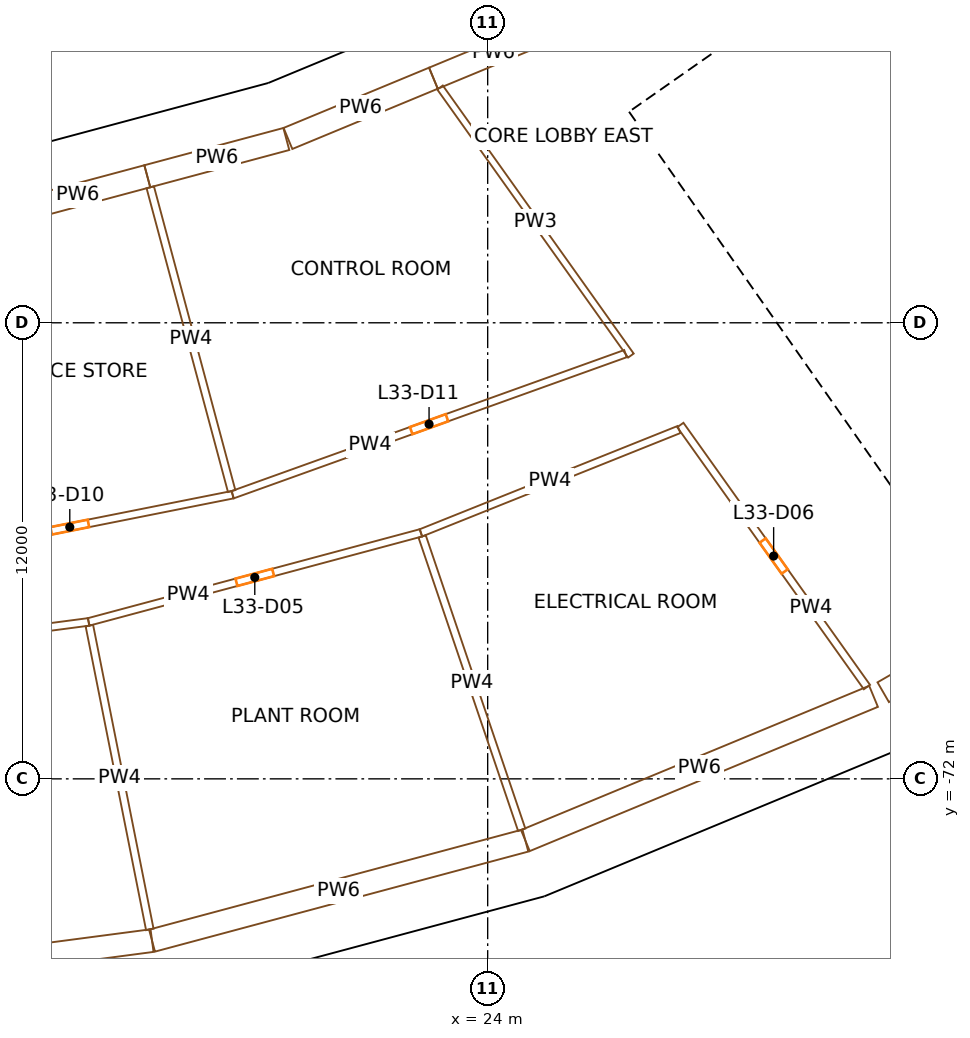
"""IFC4 building model, lengths in metres.
Left out: names, types, materials, properties, quantities, classifications, styles, units other than length and angle.
Written with IfcOpenShell. Run it as: python <this file> out.ifc"""

import sys

from ifc_helpers import new_model, si_unit, direction, frame, frame_2d, origin, origin_2d, place, context, subcontext, project, spatial, rectangle, extrude, element, fill, save


model = new_model("IFC4")
c1 = context("Model", 3, precision=1e-05, world=origin(), true_north=direction((0.0, 1.0)))
c2 = subcontext(c1, "Body", "Model", "MODEL_VIEW")
j1 = project(units=[si_unit("LENGTHUNIT", "METRE"), si_unit("PLANEANGLEUNIT", "RADIAN")], contexts=[c1])
p1 = place(None, origin())
s1 = spatial("IfcSite", under=j1, at=p1, CompositionType="ELEMENT")
p2 = place(p1, origin())
s2 = spatial("IfcBuilding", under=s1, at=p2, CompositionType="ELEMENT")
p3 = place(p2, frame((0.0, 0.0, 144.3)))
s3 = spatial("IfcBuildingStorey", under=s2, at=p3, CompositionType="ELEMENT", Elevation=144.3)
for number, where, z_axis, x_axis in (
    (1, (15.168, -76.256, 0.0), (0.0, 0.0, 1.0), (0.981, 0.195, 0.0)),
    (2, (18.724, -55.159, 0.0), (0.0, 0.0, 1.0), (0.947, 0.321, 0.0)),
    (3, (24.992, -73.624, 0.0), (0.0, 0.0, 1.0), (0.947, 0.321, 0.0)),
    (4, (25.763, -52.243, 0.0), (0.0, 0.0, 1.0), (0.897, 0.442, 0.0)),
    (5, (34.388, -69.732, 0.0), (0.0, 0.0, 1.0), (0.897, 0.442, 0.0)),
):
    element("IfcColumn", number, at=place(p3, frame(where, z_axis=z_axis, x_axis=x_axis)), inside=s3, PredefinedType="COLUMN", context=c2, shape_type="SweptSolid", body=[
        extrude(rectangle(XDim=1.2, YDim=1.5, at=origin_2d()), origin(), (0.0, 0.0, 1.0), 5.0),
    ])
p4 = place(p3, frame((36.717, -66.337, 0.0), z_axis=(0.0, 0.0, 1.0), x_axis=(-0.573577477574, 0.819151315216, 0.0)))
e6 = element("IfcWall", 6, at=p4, inside=s3, PredefinedType="SHEAR", context=c2, shape_type="SweptSolid", body=[
    extrude(rectangle(XDim=14.8, YDim=0.9, at=frame_2d((7.4, 0.0))), origin(), (0.0, 0.0, 1.0), 4.7),
])
p5 = place(p4, frame((6.2, 0.0, 0.0)))
e7 = element("IfcOpeningElement", 7, at=p5, cuts=e6, PredefinedType="OPENING", context=c2, shape_type="SweptSolid", body=[
    extrude(rectangle(XDim=2.4, YDim=2.1, at=frame_2d((1.2, 1.05))), frame((0.0, 0.46, 0.0), z_axis=(0.0, -1.0, 0.0), x_axis=(1.0, 0.0, 0.0)), (0.0, 0.0, 1.0), 0.92),
])
p6 = place(p3, frame((28.854, -54.324, 0.0), z_axis=(0.0, 0.0, 1.0), x_axis=(0.819145767589, 0.573585400304, 0.0)))
e8 = element("IfcWall", 8, at=p6, inside=s3, PredefinedType="SHEAR", context=c2, shape_type="SweptSolid", body=[
    extrude(rectangle(XDim=15.045, YDim=0.9, at=frame_2d((7.523, 0.0))), origin(), (0.0, 0.0, 1.0), 4.7),
])
p7 = place(p6, frame((3.45, 0.0, 0.0)))
e9 = element("IfcOpeningElement", 9, at=p7, cuts=e8, PredefinedType="OPENING", context=c2, shape_type="SweptSolid", body=[
    extrude(rectangle(XDim=1.0, YDim=2.1, at=frame_2d((0.5, 1.05))), frame((0.0, 0.46, 0.0), z_axis=(0.0, -1.0, 0.0), x_axis=(1.0, 0.0, 0.0)), (0.0, 0.0, 1.0), 0.92),
])
p8 = place(p6, frame((13.495, 0.0, 0.0)))
e10 = element("IfcOpeningElement", 10, at=p8, cuts=e8, PredefinedType="OPENING", context=c2, shape_type="SweptSolid", body=[
    extrude(rectangle(XDim=1.1, YDim=2.1, at=frame_2d((0.55, 1.05))), frame((0.0, 0.46, 0.0), z_axis=(0.0, -1.0, 0.0), x_axis=(1.0, 0.0, 0.0)), (0.0, 0.0, 1.0), 0.92),
])
p9 = place(p3, frame((31.895, -58.666, 0.0), z_axis=(0.0, 0.0, 1.0), x_axis=(0.819166993208, 0.573555086491, 0.0)))
e11 = element("IfcWall", 11, at=p9, inside=s3, PredefinedType="SOLIDWALL", context=c2, shape_type="SweptSolid", body=[
    extrude(rectangle(XDim=7.95, YDim=0.3, at=frame_2d((3.975, 0.0))), origin(), (0.0, 0.0, 1.0), 4.7),
])
p10 = place(p9, frame((0.675, 0.0, 0.0)))
e12 = element("IfcOpeningElement", 12, at=p10, cuts=e11, PredefinedType="OPENING", context=c2, shape_type="SweptSolid", body=[
    extrude(rectangle(XDim=1.1, YDim=2.1, at=frame_2d((0.55, 1.05))), frame((0.0, 0.16, 0.0), z_axis=(0.0, -1.0, 0.0), x_axis=(1.0, 0.0, 0.0)), (0.0, 0.0, 1.0), 0.32),
])
p11 = place(p9, frame((3.425, 0.0, 0.0)))
e13 = element("IfcOpeningElement", 13, at=p11, cuts=e11, PredefinedType="OPENING", context=c2, shape_type="SweptSolid", body=[
    extrude(rectangle(XDim=1.1, YDim=2.1, at=frame_2d((0.55, 1.05))), frame((0.0, 0.16, 0.0), z_axis=(0.0, -1.0, 0.0), x_axis=(1.0, 0.0, 0.0)), (0.0, 0.0, 1.0), 0.32),
])
p12 = place(p9, frame((6.175, 0.0, 0.0)))
e14 = element("IfcOpeningElement", 14, at=p12, cuts=e11, PredefinedType="OPENING", context=c2, shape_type="SweptSolid", body=[
    extrude(rectangle(XDim=1.1, YDim=2.1, at=frame_2d((0.55, 1.05))), frame((0.0, 0.16, 0.0), z_axis=(0.0, -1.0, 0.0), x_axis=(1.0, 0.0, 0.0)), (0.0, 0.0, 1.0), 0.32),
])
p13 = place(p3, frame((30.461, -56.618, 0.0), z_axis=(0.0, 0.0, 1.0), x_axis=(0.819142461705, 0.573590121456, 0.0)))
e15 = element("IfcWall", 15, at=p13, inside=s3, PredefinedType="SOLIDWALL", context=c2, shape_type="SweptSolid", body=[
    extrude(rectangle(XDim=7.95, YDim=0.3, at=frame_2d((3.975, 0.0))), origin(), (0.0, 0.0, 1.0), 4.7),
])
p14 = place(p3, frame((33.938, -57.052, 0.0), z_axis=(0.0, 0.0, 1.0), x_axis=(-0.573581496053, 0.819148501424, 0.0)))
e16 = element("IfcWall", 16, at=p14, inside=s3, PredefinedType="SOLIDWALL", context=c2, shape_type="SweptSolid", body=[
    extrude(rectangle(XDim=2.2, YDim=0.3, at=frame_2d((1.1, 0.0))), origin(), (0.0, 0.0, 1.0), 4.7),
])
p15 = place(p3, frame((33.787, -61.369, 3.4), z_axis=(0.0, 0.0, 1.0), x_axis=(0.819139727204, 0.57359402657, 0.0)))
e17 = element("IfcWall", 17, at=p15, inside=s3, PredefinedType="SOLIDWALL", context=c2, shape_type="SweptSolid", body=[
    extrude(rectangle(XDim=5.35, YDim=0.3, at=frame_2d((2.675, 0.0))), origin(), (0.0, 0.0, 1.0), 1.3),
])
p16 = place(p3, frame((18.314, -53.874, 0.0), z_axis=(0.0, 0.0, 1.0), x_axis=(-0.965928708291, -0.258808289086, 0.0)))
e18 = element("IfcWall", 18, at=p16, inside=s3, PredefinedType="SOLIDWALL", context=c2, shape_type="SweptSolid", body=[
    extrude(rectangle(XDim=7.493, YDim=0.4, at=frame_2d((3.747, 0.0))), origin(), (0.0, 0.0, 1.0), 3.6),
])
p17 = place(p3, frame((25.12, -51.052, 0.0), z_axis=(0.0, 0.0, 1.0), x_axis=(-0.923875784142, -0.382692481603, 0.0)))
e19 = element("IfcWall", 19, at=p17, inside=s3, PredefinedType="SOLIDWALL", context=c2, shape_type="SweptSolid", body=[
    extrude(rectangle(XDim=7.342, YDim=0.4, at=frame_2d((3.671, 0.0))), origin(), (0.0, 0.0, 1.0), 3.6),
])
p18 = place(p3, frame((15.48, -77.567, 0.0), z_axis=(0.0, 0.0, 1.0), x_axis=(0.965921778254, 0.258834152101, 0.0)))
e20 = element("IfcWall", 20, at=p18, inside=s3, PredefinedType="SOLIDWALL", context=c2, shape_type="SweptSolid", body=[
    extrude(rectangle(XDim=10.245, YDim=0.4, at=frame_2d((5.123, 0.0))), origin(), (0.0, 0.0, 1.0), 3.6),
])
p19 = place(p3, frame((25.403, -74.911, 0.0), z_axis=(0.0, 0.0, 1.0), x_axis=(0.923878024815, 0.382687072245, 0.0)))
e21 = element("IfcWall", 21, at=p19, inside=s3, PredefinedType="SOLIDWALL", context=c2, shape_type="SweptSolid", body=[
    extrude(rectangle(XDim=10.397, YDim=0.4, at=frame_2d((5.198, 0.0))), origin(), (0.0, 0.0, 1.0), 3.6),
])
p20 = place(p3, frame((13.5, -67.87, 0.0), z_axis=(0.0, 0.0, 1.0), x_axis=(-0.991446306881, -0.13051521203, 0.0)))
e22 = element("IfcWall", 22, at=p20, inside=s3, PredefinedType="PARTITIONING", context=c2, shape_type="SweptSolid", body=[
    extrude(rectangle(XDim=9.052, YDim=0.2, at=frame_2d((4.526, 0.0))), origin(), (0.0, 0.0, 1.0), 3.6),
])
p21 = place(p20, frame((4.026, 0.0, 0.0)))
e23 = element("IfcOpeningElement", 23, at=p21, cuts=e22, PredefinedType="OPENING", context=c2, shape_type="SweptSolid", body=[
    extrude(rectangle(XDim=1.0, YDim=2.1, at=frame_2d((0.5, 1.05))), frame((0.0, 0.11, 0.0), z_axis=(0.0, -1.0, 0.0), x_axis=(1.0, 0.0, 0.0)), (0.0, 0.0, 1.0), 0.22),
])
p22 = place(p3, frame((5.085, -77.583, 0.0), z_axis=(0.0, 0.0, 1.0), x_axis=(0.99144563226, 0.130520336625, 0.0)))
e24 = element("IfcWall", 24, at=p22, inside=s3, PredefinedType="PARTITIONING", context=c2, shape_type="SweptSolid", body=[
    extrude(rectangle(XDim=10.17, YDim=0.6, at=frame_2d((5.085, 0.0))), origin(), (0.0, 0.0, 1.0), 3.6),
])
p23 = place(p3, frame((8.719, -66.229, 0.0), z_axis=(0.0, 0.0, 1.0), x_axis=(0.980786466832, 0.195084357342, 0.0)))
e25 = element("IfcWall", 25, at=p23, inside=s3, PredefinedType="PARTITIONING", context=c2, shape_type="SweptSolid", body=[
    extrude(rectangle(XDim=8.738, YDim=0.2, at=frame_2d((4.369, 0.0))), origin(), (0.0, 0.0, 1.0), 3.6),
])
p24 = place(p23, frame((3.869, 0.0, 0.0)))
e26 = element("IfcOpeningElement", 26, at=p24, cuts=e25, PredefinedType="OPENING", context=c2, shape_type="SweptSolid", body=[
    extrude(rectangle(XDim=1.0, YDim=2.1, at=frame_2d((0.5, 1.05))), frame((0.0, 0.11, 0.0), z_axis=(0.0, -1.0, 0.0), x_axis=(1.0, 0.0, 0.0)), (0.0, 0.0, 1.0), 0.22),
])
p25 = place(p3, frame((11.386, -57.125, 0.0), z_axis=(0.0, 0.0, 1.0), x_axis=(0.965936829447, 0.258777977267, 0.0)))
e27 = element("IfcWall", 27, at=p25, inside=s3, PredefinedType="PARTITIONING", context=c2, shape_type="SweptSolid", body=[
    extrude(rectangle(XDim=3.787, YDim=0.6, at=frame_2d((1.894, 0.0))), origin(), (0.0, 0.0, 1.0), 3.6),
])
p26 = place(p3, frame((22.244, -65.528, 0.0), z_axis=(0.0, 0.0, 1.0), x_axis=(-0.965926260719, -0.258817423781, 0.0)))
e28 = element("IfcWall", 28, at=p26, inside=s3, PredefinedType="PARTITIONING", context=c2, shape_type="SweptSolid", body=[
    extrude(rectangle(XDim=9.052, YDim=0.2, at=frame_2d((4.526, 0.0))), origin(), (0.0, 0.0, 1.0), 3.6),
])
p27 = place(p26, frame((4.026, 0.0, 0.0)))
e29 = element("IfcOpeningElement", 29, at=p27, cuts=e28, PredefinedType="OPENING", context=c2, shape_type="SweptSolid", body=[
    extrude(rectangle(XDim=1.0, YDim=2.1, at=frame_2d((0.5, 1.05))), frame((0.0, 0.11, 0.0), z_axis=(0.0, -1.0, 0.0), x_axis=(1.0, 0.0, 0.0)), (0.0, 0.0, 1.0), 0.22),
])
p28 = place(p3, frame((15.122, -56.435, 0.0), z_axis=(0.0, 0.0, 1.0), x_axis=(0.258815723485, -0.965926716308, 0.0)))
e30 = element("IfcWall", 30, at=p28, inside=s3, PredefinedType="PARTITIONING", context=c2, shape_type="SweptSolid", body=[
    extrude(rectangle(XDim=8.275, YDim=0.2, at=frame_2d((4.137, 0.0))), origin(), (0.0, 0.0, 1.0), 3.6),
])
p29 = place(p3, frame((15.044, -56.145, 0.0), z_axis=(0.0, 0.0, 1.0), x_axis=(0.965920713003, 0.258838127392, 0.0)))
e31 = element("IfcWall", 31, at=p29, inside=s3, PredefinedType="PARTITIONING", context=c2, shape_type="SweptSolid", body=[
    extrude(rectangle(XDim=3.787, YDim=0.6, at=frame_2d((1.894, 0.0))), origin(), (0.0, 0.0, 1.0), 3.6),
])
p30 = place(p3, frame((15.11, -75.962, 0.0), z_axis=(0.0, 0.0, 1.0), x_axis=(-0.195102141606, 0.980782929267, 0.0)))
e32 = element("IfcWall", 32, at=p30, inside=s3, PredefinedType="PARTITIONING", context=c2, shape_type="SweptSolid", body=[
    extrude(rectangle(XDim=8.15, YDim=0.2, at=frame_2d((4.075, 0.0))), origin(), (0.0, 0.0, 1.0), 3.6),
])
p31 = place(p3, frame((15.168, -76.256, 0.0), z_axis=(0.0, 0.0, 1.0), x_axis=(0.965924263558, 0.258824877223, 0.0)))
e33 = element("IfcWall", 33, at=p31, inside=s3, PredefinedType="PARTITIONING", context=c2, shape_type="SweptSolid", body=[
    extrude(rectangle(XDim=10.17, YDim=0.6, at=frame_2d((5.085, 0.0))), origin(), (0.0, 0.0, 1.0), 3.6),
])
p32 = place(p3, frame((17.289, -64.524, 0.0), z_axis=(0.0, 0.0, 1.0), x_axis=(0.941152070644, 0.337983401845, 0.0)))
e34 = element("IfcWall", 34, at=p32, inside=s3, PredefinedType="PARTITIONING", context=c2, shape_type="SweptSolid", body=[
    extrude(rectangle(XDim=10.983, YDim=0.2, at=frame_2d((5.492, 0.0))), origin(), (0.0, 0.0, 1.0), 3.6),
])
p33 = place(p32, frame((4.992, 0.0, 0.0)))
e35 = element("IfcOpeningElement", 35, at=p33, cuts=e34, PredefinedType="OPENING", context=c2, shape_type="SweptSolid", body=[
    extrude(rectangle(XDim=1.0, YDim=2.1, at=frame_2d((0.5, 1.05))), frame((0.0, 0.11, 0.0), z_axis=(0.0, -1.0, 0.0), x_axis=(1.0, 0.0, 0.0)), (0.0, 0.0, 1.0), 0.22),
])
p34 = place(p3, frame((18.745, -55.15, 0.0), z_axis=(0.0, 0.0, 1.0), x_axis=(0.923892575647, 0.382651941932, 0.0)))
e36 = element("IfcWall", 36, at=p34, inside=s3, PredefinedType="PARTITIONING", context=c2, shape_type="SweptSolid", body=[
    extrude(rectangle(XDim=4.143, YDim=0.6, at=frame_2d((2.071, 0.0))), origin(), (0.0, 0.0, 1.0), 3.6),
])
p35 = place(p3, frame((22.244, -65.528, 0.0), z_axis=(0.0, 0.0, 1.0), x_axis=(0.928343133184, 0.371724396657, 0.0)))
e37 = element("IfcWall", 37, at=p35, inside=s3, PredefinedType="PARTITIONING", context=c2, shape_type="SweptSolid", body=[
    extrude(rectangle(XDim=7.315, YDim=0.2, at=frame_2d((3.658, 0.0))), origin(), (0.0, 0.0, 1.0), 3.6),
])
p36 = place(p3, frame((22.572, -53.565, 0.0), z_axis=(0.0, 0.0, 1.0), x_axis=(0.923868542125, 0.382709964427, 0.0)))
e38 = element("IfcWall", 38, at=p36, inside=s3, PredefinedType="PARTITIONING", context=c2, shape_type="SweptSolid", body=[
    extrude(rectangle(XDim=3.431, YDim=0.6, at=frame_2d((1.716, 0.0))), origin(), (0.0, 0.0, 1.0), 3.6),
])
p37 = place(p3, frame((22.746, -53.809, 0.0), z_axis=(0.0, 0.0, 1.0), x_axis=(0.580002652606, -0.814614585537, 0.0)))
e39 = element("IfcWall", 39, at=p37, inside=s3, PredefinedType="PARTITIONING", context=c2, shape_type="SweptSolid", body=[
    extrude(rectangle(XDim=8.659, YDim=0.18, at=frame_2d((4.33, 0.0))), origin(), (0.0, 0.0, 1.0), 3.6),
])
p38 = place(p3, frame((24.896, -73.34, 0.0), z_axis=(0.0, 0.0, 1.0), x_axis=(-0.321453202328, 0.946925466292, 0.0)))
e40 = element("IfcWall", 40, at=p38, inside=s3, PredefinedType="PARTITIONING", context=c2, shape_type="SweptSolid", body=[
    extrude(rectangle(XDim=8.15, YDim=0.2, at=frame_2d((4.075, 0.0))), origin(), (0.0, 0.0, 1.0), 3.6),
])
p39 = place(p3, frame((24.992, -73.624, 0.0), z_axis=(0.0, 0.0, 1.0), x_axis=(0.923879094783, 0.382684489133, 0.0)))
e41 = element("IfcWall", 41, at=p39, inside=s3, PredefinedType="PARTITIONING", context=c2, shape_type="SweptSolid", body=[
    extrude(rectangle(XDim=9.916, YDim=0.6, at=frame_2d((4.958, 0.0))), origin(), (0.0, 0.0, 1.0), 3.6),
])
p40 = place(p3, frame((33.979, -69.585, 0.0), z_axis=(0.0, 0.0, 1.0), x_axis=(-0.580017920191, 0.814603714856, 0.0)))
e42 = element("IfcWall", 42, at=p40, inside=s3, PredefinedType="PARTITIONING", context=c2, shape_type="SweptSolid", body=[
    extrude(rectangle(XDim=8.464, YDim=0.2, at=frame_2d((4.232, 0.0))), origin(), (0.0, 0.0, 1.0), 3.6),
])
p41 = place(p40, frame((3.732, 0.0, 0.0)))
e43 = element("IfcOpeningElement", 43, at=p41, cuts=e42, PredefinedType="OPENING", context=c2, shape_type="SweptSolid", body=[
    extrude(rectangle(XDim=1.0, YDim=2.1, at=frame_2d((0.5, 1.05))), frame((0.0, 0.11, 0.0), z_axis=(0.0, -1.0, 0.0), x_axis=(1.0, 0.0, 0.0)), (0.0, 0.0, 1.0), 0.22),
])
p42 = place(p3, frame((34.407, -69.72, 0.0), z_axis=(0.0, 0.0, 1.0), x_axis=(0.866037016931, 0.4999798849, 0.0)))
e44 = element("IfcWall", 44, at=p42, inside=s3, PredefinedType="PARTITIONING", context=c2, shape_type="SweptSolid", body=[
    extrude(rectangle(XDim=10.125, YDim=0.6, at=frame_2d((5.062, 0.0))), origin(), (0.0, 0.0, 1.0), 3.6),
])
p43 = place(p5, origin())
e45 = element("IfcDoor", 45, at=p43, inside=s3, OperationType="DOUBLE_DOOR_SINGLE_SWING", PredefinedType="DOOR", context=c2, shape_type="SweptSolid", body=[
    extrude(rectangle(XDim=2.4, YDim=2.1, at=frame_2d((1.2, 1.05))), frame((0.0, 0.025, 0.0), z_axis=(0.0, -1.0, 0.0), x_axis=(1.0, 0.0, 0.0)), (0.0, 0.0, 1.0), 0.05),
])
fill(e7, e45)
p44 = place(p10, origin())
e46 = element("IfcDoor", 46, at=p44, inside=s3, OperationType="DOUBLE_DOOR_SLIDING", PredefinedType="DOOR", context=c2, shape_type="SweptSolid", body=[
    extrude(rectangle(XDim=1.1, YDim=2.1, at=frame_2d((0.55, 1.05))), frame((0.0, 0.025, 0.0), z_axis=(0.0, -1.0, 0.0), x_axis=(1.0, 0.0, 0.0)), (0.0, 0.0, 1.0), 0.05),
])
fill(e12, e46)
p45 = place(p27, origin())
e47 = element("IfcDoor", 47, at=p45, inside=s3, OperationType="SINGLE_SWING_RIGHT", PredefinedType="DOOR", context=c2, shape_type="SweptSolid", body=[
    extrude(rectangle(XDim=1.0, YDim=2.1, at=frame_2d((0.5, 1.05))), frame((0.0, 0.025, 0.0), z_axis=(0.0, -1.0, 0.0), x_axis=(1.0, 0.0, 0.0)), (0.0, 0.0, 1.0), 0.05),
])
fill(e29, e47)
p46 = place(p41, origin())
e48 = element("IfcDoor", 48, at=p46, inside=s3, OperationType="SINGLE_SWING_RIGHT", PredefinedType="DOOR", context=c2, shape_type="SweptSolid", body=[
    extrude(rectangle(XDim=1.0, YDim=2.1, at=frame_2d((0.5, 1.05))), frame((0.0, 0.025, 0.0), z_axis=(0.0, -1.0, 0.0), x_axis=(1.0, 0.0, 0.0)), (0.0, 0.0, 1.0), 0.05),
])
fill(e43, e48)
p47 = place(p24, origin())
e49 = element("IfcDoor", 49, at=p47, inside=s3, OperationType="SINGLE_SWING_RIGHT", PredefinedType="DOOR", context=c2, shape_type="SweptSolid", body=[
    extrude(rectangle(XDim=1.0, YDim=2.1, at=frame_2d((0.5, 1.05))), frame((0.0, 0.025, 0.0), z_axis=(0.0, -1.0, 0.0), x_axis=(1.0, 0.0, 0.0)), (0.0, 0.0, 1.0), 0.05),
])
fill(e26, e49)
p48 = place(p33, origin())
e50 = element("IfcDoor", 50, at=p48, inside=s3, OperationType="SINGLE_SWING_RIGHT", PredefinedType="DOOR", context=c2, shape_type="SweptSolid", body=[
    extrude(rectangle(XDim=1.0, YDim=2.1, at=frame_2d((0.5, 1.05))), frame((0.0, 0.025, 0.0), z_axis=(0.0, -1.0, 0.0), x_axis=(1.0, 0.0, 0.0)), (0.0, 0.0, 1.0), 0.05),
])
fill(e35, e50)
save(model, sys.argv[1])
